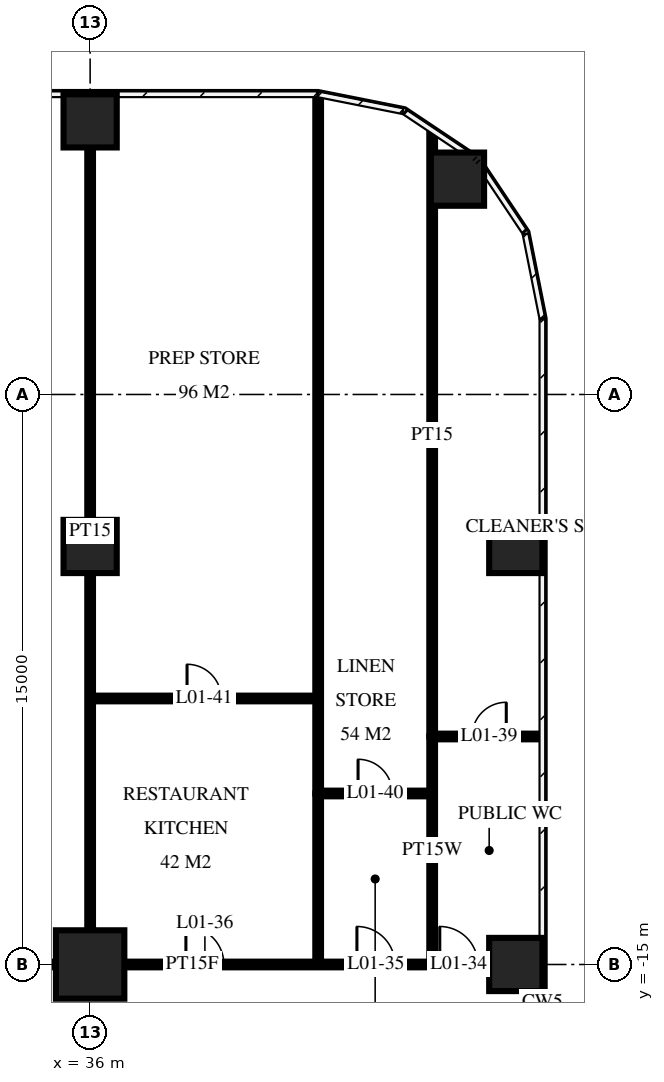
"""IFC4 building model, lengths in metres.
Left out: names, types, materials, properties, quantities, classifications, styles, units other than length and angle.
Written with IfcOpenShell. Run it as: python <this file> out.ifc"""

import sys

from ifc_helpers import new_model, si_unit, direction, frame, frame_2d, origin, origin_2d, place, context, subcontext, project, spatial, rectangle, circle, extrude, element, fill, save


model = new_model("IFC4")
c1 = context("Model", 3, precision=1e-05, world=origin(), true_north=direction((0.0, 1.0)))
c2 = subcontext(c1, "Body", "Model", "MODEL_VIEW")
j1 = project(units=[si_unit("LENGTHUNIT", "METRE"), si_unit("PLANEANGLEUNIT", "RADIAN")], contexts=[c1])
p1 = place(None, origin())
s1 = spatial("IfcSite", under=j1, at=p1, CompositionType="ELEMENT")
p2 = place(p1, origin())
s2 = spatial("IfcBuilding", under=s1, at=p2, CompositionType="ELEMENT")
p3 = place(p2, frame((0.0, 0.0, 7.0)))
s3 = spatial("IfcBuildingStorey", under=s2, at=p3, CompositionType="ELEMENT", Elevation=7.0)
p4 = place(p3, frame((36.0, -15.0, 0.0), z_axis=(0.0, 0.0, 1.0), x_axis=(1.0, 0.0, 0.0)))
e1 = element("IfcColumn", 1, at=p4, inside=s3, PredefinedType="COLUMN", context=c2, shape_type="SweptSolid", body=[
    extrude(circle(Radius=0.9, at=origin_2d()), origin(), (0.0, 0.0, 1.0), 5.5),
])
for number, where, z_axis, x_axis in (
    (2, (36.0, -4.0, 0.0), (0.0, 0.0, 1.0), (1.0, 0.0, 0.0)),
    (3, (36.0, 7.2, 0.0), (0.0, 0.0, 1.0), (1.0, 0.0, 0.0)),
    (4, (45.666, 5.666, 0.0), (0.0, 0.0, 1.0), (1.0, 0.0, 0.0)),
    (5, (47.2, -15.0, 0.0), (0.0, 0.0, 1.0), (1.0, 0.0, 0.0)),
    (6, (47.2, -4.0, 0.0), (0.0, 0.0, 1.0), (1.0, 0.0, 0.0)),
):
    element("IfcColumn", number, at=place(p3, frame(where, z_axis=z_axis, x_axis=x_axis)), inside=s3, PredefinedType="COLUMN", context=c2, shape_type="SweptSolid", body=[
        extrude(circle(Radius=0.7, at=origin_2d()), origin(), (0.0, 0.0, 1.0), 5.5),
    ])
p5 = place(p3, frame((45.0, -9.0, 0.0), z_axis=(0.0, 0.0, 1.0), x_axis=(0.0, 1.0, 0.0)))
e7 = element("IfcWall", 7, at=p5, inside=s3, PredefinedType="PARTITIONING", context=c2, shape_type="SweptSolid", body=[
    extrude(rectangle(XDim=15.856, YDim=0.15, at=frame_2d((7.928, 0.0))), origin(), (0.0, 0.0, 1.0), 5.05),
])
p6 = place(p3, frame((45.0, -15.0, 0.0), z_axis=(0.0, 0.0, 1.0), x_axis=(0.0, 1.0, 0.0)))
e8 = element("IfcWall", 8, at=p6, inside=s3, PredefinedType="PLUMBINGWALL", context=c2, shape_type="SweptSolid", body=[
    extrude(rectangle(XDim=6.0, YDim=0.15, at=frame_2d((3.0, 0.0))), origin(), (0.0, 0.0, 1.0), 5.05),
])
p7 = place(p3, frame((42.0, -10.5, 0.0), z_axis=(0.0, 0.0, 1.0), x_axis=(0.0, 1.0, 0.0)))
e9 = element("IfcWall", 9, at=p7, inside=s3, PredefinedType="PARTITIONING", context=c2, shape_type="SweptSolid", body=[
    extrude(rectangle(XDim=18.316, YDim=0.15, at=frame_2d((9.158, 0.0))), origin(), (0.0, 0.0, 1.0), 5.05),
])
p8 = place(p3, frame((42.0, -15.0, 0.0), z_axis=(0.0, 0.0, 1.0), x_axis=(0.0, 1.0, 0.0)))
e10 = element("IfcWall", 10, at=p8, inside=s3, PredefinedType="PLUMBINGWALL", context=c2, shape_type="SweptSolid", body=[
    extrude(rectangle(XDim=4.5, YDim=0.15, at=frame_2d((2.25, 0.0))), origin(), (0.0, 0.0, 1.0), 5.05),
])
p9 = place(p3, frame((36.0, -15.0, 0.0), z_axis=(0.0, 0.0, 1.0), x_axis=(0.0, 1.0, 0.0)))
e11 = element("IfcWall", 11, at=p9, inside=s3, PredefinedType="PARTITIONING", context=c2, shape_type="SweptSolid", body=[
    extrude(rectangle(XDim=22.82, YDim=0.15, at=frame_2d((11.41, 0.0))), origin(), (0.0, 0.0, 1.0), 5.05),
])
p10 = place(p3, frame((29.55, -15.0, 0.0), z_axis=(0.0, 0.0, 1.0), x_axis=(1.0, 0.0, 0.0)))
e12 = element("IfcWall", 12, at=p10, inside=s3, PredefinedType="PARTITIONING", context=c2, shape_type="SweptSolid", body=[
    extrude(rectangle(XDim=18.27, YDim=0.15, at=frame_2d((9.135, 0.0))), origin(), (0.0, 0.0, 1.0), 5.05),
])
p11 = place(p10, frame((15.65, 0.0, 0.0)))
e13 = element("IfcOpeningElement", 13, at=p11, cuts=e12, PredefinedType="OPENING", context=c2, shape_type="SweptSolid", body=[
    extrude(rectangle(XDim=1.0, YDim=2.1, at=frame_2d((0.5, 1.05))), frame((0.0, 0.085, 0.0), z_axis=(0.0, -1.0, 0.0), x_axis=(1.0, 0.0, 0.0)), (0.0, 0.0, 1.0), 0.17),
])
p12 = place(p10, frame((13.47, 0.0, 0.0)))
e14 = element("IfcOpeningElement", 14, at=p12, cuts=e12, PredefinedType="OPENING", context=c2, shape_type="SweptSolid", body=[
    extrude(rectangle(XDim=1.0, YDim=2.1, at=frame_2d((0.5, 1.05))), frame((0.0, 0.085, 0.0), z_axis=(0.0, -1.0, 0.0), x_axis=(1.0, 0.0, 0.0)), (0.0, 0.0, 1.0), 0.17),
])
p13 = place(p10, frame((8.97, 0.0, 0.0)))
e15 = element("IfcOpeningElement", 15, at=p13, cuts=e12, PredefinedType="OPENING", context=c2, shape_type="SweptSolid", body=[
    extrude(rectangle(XDim=1.0, YDim=2.1, at=frame_2d((0.5, 1.05))), frame((0.0, 0.085, 0.0), z_axis=(0.0, -1.0, 0.0), x_axis=(1.0, 0.0, 0.0)), (0.0, 0.0, 1.0), 0.17),
])
p14 = place(p10, frame((3.92, 0.0, 0.0)))
e16 = element("IfcOpeningElement", 16, at=p14, cuts=e12, PredefinedType="OPENING", context=c2, shape_type="SweptSolid", body=[
    extrude(rectangle(XDim=1.0, YDim=2.1, at=frame_2d((0.5, 1.05))), frame((0.0, 0.085, 0.0), z_axis=(0.0, -1.0, 0.0), x_axis=(1.0, 0.0, 0.0)), (0.0, 0.0, 1.0), 0.17),
])
p15 = place(p10, frame((0.65, 0.0, 0.0)))
e17 = element("IfcOpeningElement", 17, at=p15, cuts=e12, PredefinedType="OPENING", context=c2, shape_type="SweptSolid", body=[
    extrude(rectangle(XDim=1.0, YDim=2.1, at=frame_2d((0.5, 1.05))), frame((0.0, 0.085, 0.0), z_axis=(0.0, -1.0, 0.0), x_axis=(1.0, 0.0, 0.0)), (0.0, 0.0, 1.0), 0.17),
])
p16 = place(p3, frame((42.0, -10.5, 0.0), z_axis=(0.0, 0.0, 1.0), x_axis=(1.0, 0.0, 0.0)))
e18 = element("IfcWall", 18, at=p16, inside=s3, PredefinedType="PLUMBINGWALL", context=c2, shape_type="SweptSolid", body=[
    extrude(rectangle(XDim=3.0, YDim=0.15, at=frame_2d((1.5, 0.0))), origin(), (0.0, 0.0, 1.0), 5.05),
])
p17 = place(p16, frame((1.05, 0.0, 0.0)))
e19 = element("IfcOpeningElement", 19, at=p17, cuts=e18, PredefinedType="OPENING", context=c2, shape_type="SweptSolid", body=[
    extrude(rectangle(XDim=0.9, YDim=2.1, at=frame_2d((0.45, 1.05))), frame((0.0, 0.085, 0.0), z_axis=(0.0, -1.0, 0.0), x_axis=(1.0, 0.0, 0.0)), (0.0, 0.0, 1.0), 0.17),
])
p18 = place(p3, frame((45.0, -9.0, 0.0), z_axis=(0.0, 0.0, 1.0), x_axis=(1.0, 0.0, 0.0)))
e20 = element("IfcWall", 20, at=p18, inside=s3, PredefinedType="PLUMBINGWALL", context=c2, shape_type="SweptSolid", body=[
    extrude(rectangle(XDim=2.82, YDim=0.15, at=frame_2d((1.41, 0.0))), origin(), (0.0, 0.0, 1.0), 5.05),
])
p19 = place(p18, frame((1.05, 0.0, 0.0)))
e21 = element("IfcOpeningElement", 21, at=p19, cuts=e20, PredefinedType="OPENING", context=c2, shape_type="SweptSolid", body=[
    extrude(rectangle(XDim=0.9, YDim=2.1, at=frame_2d((0.45, 1.05))), frame((0.0, 0.085, 0.0), z_axis=(0.0, -1.0, 0.0), x_axis=(1.0, 0.0, 0.0)), (0.0, 0.0, 1.0), 0.17),
])
p20 = place(p3, frame((36.0, -8.0, 0.0), z_axis=(0.0, 0.0, 1.0), x_axis=(1.0, 0.0, 0.0)))
e22 = element("IfcWall", 22, at=p20, inside=s3, PredefinedType="PARTITIONING", context=c2, shape_type="SweptSolid", body=[
    extrude(rectangle(XDim=6.0, YDim=0.15, at=frame_2d((3.0, 0.0))), origin(), (0.0, 0.0, 1.0), 5.05),
])
p21 = place(p20, frame((2.55, 0.0, 0.0)))
e23 = element("IfcOpeningElement", 23, at=p21, cuts=e22, PredefinedType="OPENING", context=c2, shape_type="SweptSolid", body=[
    extrude(rectangle(XDim=0.9, YDim=2.1, at=frame_2d((0.45, 1.05))), frame((0.0, 0.085, 0.0), z_axis=(0.0, -1.0, 0.0), x_axis=(1.0, 0.0, 0.0)), (0.0, 0.0, 1.0), 0.17),
])
p22 = place(p11, origin())
e24 = element("IfcDoor", 24, at=p22, inside=s3, OperationType="SINGLE_SWING_RIGHT", PredefinedType="DOOR", context=c2, shape_type="SweptSolid", body=[
    extrude(rectangle(XDim=1.0, YDim=2.1, at=frame_2d((0.5, 1.05))), frame((0.0, 0.025, 0.0), z_axis=(0.0, -1.0, 0.0), x_axis=(1.0, 0.0, 0.0)), (0.0, 0.0, 1.0), 0.05),
])
fill(e13, e24)
p23 = place(p12, origin())
e25 = element("IfcDoor", 25, at=p23, inside=s3, OperationType="SINGLE_SWING_RIGHT", PredefinedType="DOOR", context=c2, shape_type="SweptSolid", body=[
    extrude(rectangle(XDim=1.0, YDim=2.1, at=frame_2d((0.5, 1.05))), frame((0.0, 0.025, 0.0), z_axis=(0.0, -1.0, 0.0), x_axis=(1.0, 0.0, 0.0)), (0.0, 0.0, 1.0), 0.05),
])
fill(e14, e25)
p24 = place(p13, origin())
e26 = element("IfcDoor", 26, at=p24, inside=s3, OperationType="SINGLE_SWING_RIGHT", PredefinedType="DOOR", context=c2, shape_type="SweptSolid", body=[
    extrude(rectangle(XDim=1.0, YDim=2.1, at=frame_2d((0.5, 1.05))), frame((0.0, 0.025, 0.0), z_axis=(0.0, -1.0, 0.0), x_axis=(1.0, 0.0, 0.0)), (0.0, 0.0, 1.0), 0.05),
])
fill(e15, e26)
p25 = place(p19, origin())
e27 = element("IfcDoor", 27, at=p25, inside=s3, OperationType="SINGLE_SWING_LEFT", PredefinedType="DOOR", context=c2, shape_type="SweptSolid", body=[
    extrude(rectangle(XDim=0.9, YDim=2.1, at=frame_2d((0.45, 1.05))), frame((0.0, 0.025, 0.0), z_axis=(0.0, -1.0, 0.0), x_axis=(1.0, 0.0, 0.0)), (0.0, 0.0, 1.0), 0.05),
])
fill(e21, e27)
p26 = place(p17, origin())
e28 = element("IfcDoor", 28, at=p26, inside=s3, OperationType="SINGLE_SWING_RIGHT", PredefinedType="DOOR", context=c2, shape_type="SweptSolid", body=[
    extrude(rectangle(XDim=0.9, YDim=2.1, at=frame_2d((0.45, 1.05))), frame((0.0, 0.025, 0.0), z_axis=(0.0, -1.0, 0.0), x_axis=(1.0, 0.0, 0.0)), (0.0, 0.0, 1.0), 0.05),
])
fill(e19, e28)
p27 = place(p21, origin())
e29 = element("IfcDoor", 29, at=p27, inside=s3, OperationType="SINGLE_SWING_RIGHT", PredefinedType="DOOR", context=c2, shape_type="SweptSolid", body=[
    extrude(rectangle(XDim=0.9, YDim=2.1, at=frame_2d((0.45, 1.05))), frame((0.0, 0.025, 0.0), z_axis=(0.0, -1.0, 0.0), x_axis=(1.0, 0.0, 0.0)), (0.0, 0.0, 1.0), 0.05),
])
fill(e23, e29)
save(model, sys.argv[1])
